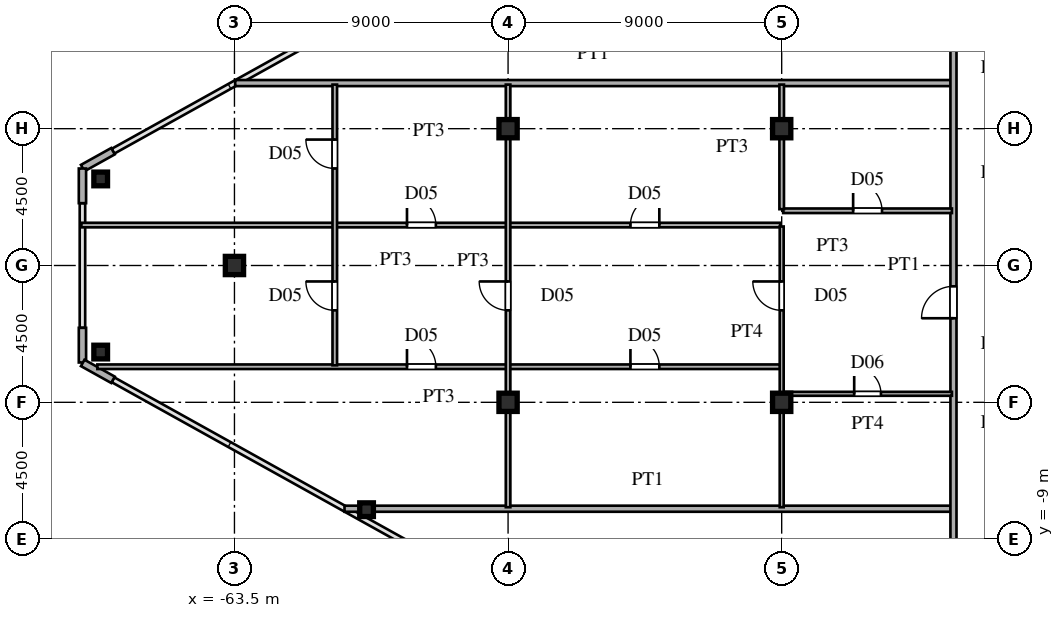
"""IFC4 building model, lengths in metres.
Left out: names, types, materials, properties, quantities, classifications, styles, units other than length and angle.
Written with IfcOpenShell. Run it as: python <this file> out.ifc"""

import sys

from ifc_helpers import new_model, si_unit, direction, frame, frame_2d, origin, origin_2d, place, context, subcontext, project, spatial, rectangle, hollow_rectangle, i_section, extrude, source, transform, mapped, element, fill, save


model = new_model("IFC4")
c1 = context("Model", 3, precision=1e-05, world=origin(), true_north=direction((0.0, 1.0)))
c2 = subcontext(c1, "Body", "Model", "MODEL_VIEW")
j1 = project(units=[si_unit("LENGTHUNIT", "METRE"), si_unit("PLANEANGLEUNIT", "RADIAN")], contexts=[c1])
p1 = place(None, origin())
s1 = spatial("IfcSite", under=j1, at=p1, CompositionType="ELEMENT")
p2 = place(p1, origin())
s2 = spatial("IfcBuilding", under=s1, at=p2, CompositionType="ELEMENT")
p3 = place(p2, frame((0.0, 0.0, 167.1)))
s3 = spatial("IfcBuildingStorey", under=s2, at=p3, CompositionType="ELEMENT", Elevation=167.1)
m1 = source(origin(), c2, "Body", "SweptSolid", [
    extrude(i_section(OverallWidth=0.6, OverallDepth=0.6, WebThickness=0.025, FlangeThickness=0.04, at=origin_2d()), origin(), (0.0, 0.0, 1.0), 3.6),
])
for number, where, z_axis, x_axis in (
    (1, (-45.5, -4.5, 0.0), (0.0, 0.0, 1.0), (1.0, 0.0, 0.0)),
    (2, (-45.5, 4.5, 0.0), (0.0, 0.0, 1.0), (1.0, 0.0, 0.0)),
    (3, (-54.5, -4.5, 0.0), (0.0, 0.0, 1.0), (1.0, 0.0, 0.0)),
    (4, (-54.5, 4.5, 0.0), (0.0, 0.0, 1.0), (1.0, 0.0, 0.0)),
    (5, (-63.5, 0.0, 0.0), (0.0, 0.0, 1.0), (1.0, 0.0, 0.0)),
):
    element("IfcColumn", number, at=place(p3, frame(where, z_axis=z_axis, x_axis=x_axis)), inside=s3, PredefinedType="COLUMN", context=c2, shape_type="MappedRepresentation", body=[
        mapped(m1, transform((0.0, 0.0, 0.0), scale=1.0)),
    ])
m2 = source(origin(), c2, "Body", "SweptSolid", [
    extrude(hollow_rectangle(XDim=0.45, YDim=0.45, WallThickness=0.018, at=origin_2d()), origin(), (0.0, 0.0, 1.0), 3.6),
])
for number, where, z_axis, x_axis in (
    (6, (-67.9, 2.847, 0.0), (0.0, 0.0, 1.0), (1.0, 0.0, 0.0)),
    (7, (-67.9, -2.847, 0.0), (0.0, 0.0, 1.0), (1.0, 0.0, 0.0)),
    (8, (-59.155, -8.031, 0.0), (0.0, 0.0, 1.0), (1.0, 0.0, 0.0)),
):
    element("IfcColumn", number, at=place(p3, frame(where, z_axis=z_axis, x_axis=x_axis)), inside=s3, PredefinedType="COLUMN", context=c2, shape_type="MappedRepresentation", body=[
        mapped(m2, transform((0.0, 0.0, 0.0), scale=1.0)),
    ])
for number, where, z_axis, x_axis in (
    (9, (-67.495, 3.759, 0.0), (0.0, 0.0, 1.0), (-0.874, -0.486, 0.0)),
    (10, (-68.5, 3.19, 0.0), (0.0, 0.0, 1.0), (0.0, -1.0, 0.0)),
    (11, (-68.5, -2.05, 0.0), (0.0, 0.0, 1.0), (0.0, -1.0, 0.0)),
    (12, (-68.491, -3.205, 0.0), (0.0, 0.0, 1.0), (0.874, -0.486, 0.0)),
):
    element("IfcWall", number, at=place(p3, frame(where, z_axis=z_axis, x_axis=x_axis)), inside=s3, PredefinedType="SOLIDWALL", context=c2, shape_type="SweptSolid", body=[
        extrude(rectangle(XDim=1.14, YDim=0.24, at=frame_2d((0.57, 0.0))), origin(), (0.0, 0.0, 1.0), 3.38),
    ])
p4 = place(p3, frame((-59.88, -8.0, 0.0), z_axis=(0.0, 0.0, 1.0), x_axis=(1.0, 0.0, 0.0)))
e13 = element("IfcWall", 13, at=p4, inside=s3, PredefinedType="PARTITIONING", context=c2, shape_type="SweptSolid", body=[
    extrude(rectangle(XDim=19.95, YDim=0.2, at=frame_2d((9.975, 0.0))), origin(), (0.0, 0.0, 1.0), 3.38),
])
p5 = place(p3, frame((-45.45, -4.22, 0.0), z_axis=(0.0, 0.0, 1.0), x_axis=(1.0, 0.0, 0.0)))
e14 = element("IfcWall", 14, at=p5, inside=s3, PredefinedType="PARTITIONING", context=c2, shape_type="SweptSolid", body=[
    extrude(rectangle(XDim=5.55, YDim=0.13, at=frame_2d((2.775, 0.0))), origin(), (0.0, 0.0, 1.0), 3.38),
])
p6 = place(p5, frame((2.335, 0.0, 0.0)))
e15 = element("IfcOpeningElement", 15, at=p6, cuts=e14, PredefinedType="OPENING", context=c2, shape_type="SweptSolid", body=[
    extrude(rectangle(XDim=0.88, YDim=2.1, at=frame_2d((0.44, 1.05))), frame((0.0, 0.075, 0.0), z_axis=(0.0, -1.0, 0.0), x_axis=(1.0, 0.0, 0.0)), (0.0, 0.0, 1.0), 0.15),
])
p7 = place(p3, frame((-68.009, -3.33, 0.0), z_axis=(0.0, 0.0, 1.0), x_axis=(1.0, 0.0, 0.0)))
e16 = element("IfcWall", 16, at=p7, inside=s3, PredefinedType="PARTITIONING", context=c2, shape_type="SweptSolid", body=[
    extrude(rectangle(XDim=22.459, YDim=0.15, at=frame_2d((11.229, 0.0))), origin(), (0.0, 0.0, 1.0), 3.38),
])
p8 = place(p7, frame((17.534, 0.0, 0.0)))
e17 = element("IfcOpeningElement", 17, at=p8, cuts=e16, PredefinedType="OPENING", context=c2, shape_type="SweptSolid", body=[
    extrude(rectangle(XDim=0.95, YDim=2.15, at=frame_2d((0.475, 1.075))), frame((0.0, 0.085, 0.0), z_axis=(0.0, -1.0, 0.0), x_axis=(1.0, 0.0, 0.0)), (0.0, 0.0, 1.0), 0.17),
])
p9 = place(p7, frame((10.184, 0.0, 0.0)))
e18 = element("IfcOpeningElement", 18, at=p9, cuts=e16, PredefinedType="OPENING", context=c2, shape_type="SweptSolid", body=[
    extrude(rectangle(XDim=0.95, YDim=2.15, at=frame_2d((0.475, 1.075))), frame((0.0, 0.085, 0.0), z_axis=(0.0, -1.0, 0.0), x_axis=(1.0, 0.0, 0.0)), (0.0, 0.0, 1.0), 0.17),
])
p10 = place(p3, frame((-68.535, 1.33, 0.0), z_axis=(0.0, 0.0, 1.0), x_axis=(1.0, 0.0, 0.0)))
e19 = element("IfcWall", 19, at=p10, inside=s3, PredefinedType="PARTITIONING", context=c2, shape_type="SweptSolid", body=[
    extrude(rectangle(XDim=22.985, YDim=0.15, at=frame_2d((11.492, 0.0))), origin(), (0.0, 0.0, 1.0), 3.38),
])
p11 = place(p10, frame((18.06, 0.0, 0.0)))
e20 = element("IfcOpeningElement", 20, at=p11, cuts=e19, PredefinedType="OPENING", context=c2, shape_type="SweptSolid", body=[
    extrude(rectangle(XDim=0.95, YDim=2.15, at=frame_2d((0.475, 1.075))), frame((0.0, 0.085, 0.0), z_axis=(0.0, -1.0, 0.0), x_axis=(1.0, 0.0, 0.0)), (0.0, 0.0, 1.0), 0.17),
])
p12 = place(p10, frame((10.71, 0.0, 0.0)))
e21 = element("IfcOpeningElement", 21, at=p12, cuts=e19, PredefinedType="OPENING", context=c2, shape_type="SweptSolid", body=[
    extrude(rectangle(XDim=0.95, YDim=2.15, at=frame_2d((0.475, 1.075))), frame((0.0, 0.085, 0.0), z_axis=(0.0, -1.0, 0.0), x_axis=(1.0, 0.0, 0.0)), (0.0, 0.0, 1.0), 0.17),
])
p13 = place(p3, frame((-45.45, 1.8, 0.0), z_axis=(0.0, 0.0, 1.0), x_axis=(1.0, 0.0, 0.0)))
e22 = element("IfcWall", 22, at=p13, inside=s3, PredefinedType="PARTITIONING", context=c2, shape_type="SweptSolid", body=[
    extrude(rectangle(XDim=5.55, YDim=0.15, at=frame_2d((2.775, 0.0))), origin(), (0.0, 0.0, 1.0), 3.38),
])
p14 = place(p13, frame((2.3, 0.0, 0.0)))
e23 = element("IfcOpeningElement", 23, at=p14, cuts=e22, PredefinedType="OPENING", context=c2, shape_type="SweptSolid", body=[
    extrude(rectangle(XDim=0.95, YDim=2.15, at=frame_2d((0.475, 1.075))), frame((0.0, 0.085, 0.0), z_axis=(0.0, -1.0, 0.0), x_axis=(1.0, 0.0, 0.0)), (0.0, 0.0, 1.0), 0.17),
])
p15 = place(p3, frame((-63.476, 6.0, 0.0), z_axis=(0.0, 0.0, 1.0), x_axis=(1.0, 0.0, 0.0)))
e24 = element("IfcWall", 24, at=p15, inside=s3, PredefinedType="PARTITIONING", context=c2, shape_type="SweptSolid", body=[
    extrude(rectangle(XDim=23.546, YDim=0.2, at=frame_2d((11.773, 0.0))), origin(), (0.0, 0.0, 1.0), 3.38),
])
p16 = place(p3, frame((-60.2, -3.283, 0.0), z_axis=(0.0, 0.0, 1.0), x_axis=(0.0, 1.0, 0.0)))
e25 = element("IfcWall", 25, at=p16, inside=s3, PredefinedType="PARTITIONING", context=c2, shape_type="SweptSolid", body=[
    extrude(rectangle(XDim=9.233, YDim=0.15, at=frame_2d((4.616, 0.0))), origin(), (0.0, 0.0, 1.0), 3.38),
])
p17 = place(p16, frame((1.808, 0.0, 0.0)))
e26 = element("IfcOpeningElement", 26, at=p17, cuts=e25, PredefinedType="OPENING", context=c2, shape_type="SweptSolid", body=[
    extrude(rectangle(XDim=0.95, YDim=2.15, at=frame_2d((0.475, 1.075))), frame((0.0, 0.085, 0.0), z_axis=(0.0, -1.0, 0.0), x_axis=(1.0, 0.0, 0.0)), (0.0, 0.0, 1.0), 0.17),
])
p18 = place(p16, frame((6.475, 0.0, 0.0)))
e27 = element("IfcOpeningElement", 27, at=p18, cuts=e25, PredefinedType="OPENING", context=c2, shape_type="SweptSolid", body=[
    extrude(rectangle(XDim=0.95, YDim=2.15, at=frame_2d((0.475, 1.075))), frame((0.0, 0.085, 0.0), z_axis=(0.0, -1.0, 0.0), x_axis=(1.0, 0.0, 0.0)), (0.0, 0.0, 1.0), 0.17),
])
p19 = place(p3, frame((-54.5, -7.95, 0.0), z_axis=(0.0, 0.0, 1.0), x_axis=(0.0, 1.0, 0.0)))
e28 = element("IfcWall", 28, at=p19, inside=s3, PredefinedType="PARTITIONING", context=c2, shape_type="SweptSolid", body=[
    extrude(rectangle(XDim=13.9, YDim=0.15, at=frame_2d((6.95, 0.0))), origin(), (0.0, 0.0, 1.0), 2.78),
])
p20 = place(p19, frame((6.475, 0.0, 0.0)))
e29 = element("IfcOpeningElement", 29, at=p20, cuts=e28, PredefinedType="OPENING", context=c2, shape_type="SweptSolid", body=[
    extrude(rectangle(XDim=0.95, YDim=2.15, at=frame_2d((0.475, 1.075))), frame((0.0, 0.085, 0.0), z_axis=(0.0, -1.0, 0.0), x_axis=(1.0, 0.0, 0.0)), (0.0, 0.0, 1.0), 0.17),
])
p21 = place(p3, frame((-45.5, -7.95, 0.0), z_axis=(0.0, 0.0, 1.0), x_axis=(0.0, 1.0, 0.0)))
e30 = element("IfcWall", 30, at=p21, inside=s3, PredefinedType="PARTITIONING", context=c2, shape_type="SweptSolid", body=[
    extrude(rectangle(XDim=9.233, YDim=0.13, at=frame_2d((4.616, 0.0))), origin(), (0.0, 0.0, 1.0), 2.78),
])
p22 = place(p21, frame((6.475, 0.0, 0.0)))
e31 = element("IfcOpeningElement", 31, at=p22, cuts=e30, PredefinedType="OPENING", context=c2, shape_type="SweptSolid", body=[
    extrude(rectangle(XDim=0.95, YDim=2.15, at=frame_2d((0.475, 1.075))), frame((0.0, 0.075, 0.0), z_axis=(0.0, -1.0, 0.0), x_axis=(1.0, 0.0, 0.0)), (0.0, 0.0, 1.0), 0.15),
])
p23 = place(p3, frame((-45.5, 1.852, 0.0), z_axis=(0.0, 0.0, 1.0), x_axis=(0.0, 1.0, 0.0)))
e32 = element("IfcWall", 32, at=p23, inside=s3, PredefinedType="PARTITIONING", context=c2, shape_type="SweptSolid", body=[
    extrude(rectangle(XDim=4.098, YDim=0.15, at=frame_2d((2.049, 0.0))), origin(), (0.0, 0.0, 1.0), 2.78),
])
p24 = place(p3, frame((-39.85, -15.715, 0.0), z_axis=(0.0, 0.0, 1.0), x_axis=(0.0, 1.0, 0.0)))
e33 = element("IfcWall", 33, at=p24, inside=s3, PredefinedType="PARTITIONING", context=c2, shape_type="SweptSolid", body=[
    extrude(rectangle(XDim=31.43, YDim=0.2, at=frame_2d((15.715, 0.0))), origin(), (0.0, 0.0, 1.0), 3.38),
])
p25 = place(p24, frame((3.29, 0.0, 0.0)))
e34 = element("IfcOpeningElement", 34, at=p25, cuts=e33, PredefinedType="OPENING", context=c2, shape_type="SweptSolid", body=[
    extrude(rectangle(XDim=1.05, YDim=2.25, at=frame_2d((0.525, 1.125))), frame((0.0, 0.11, 0.0), z_axis=(0.0, -1.0, 0.0), x_axis=(1.0, 0.0, 0.0)), (0.0, 0.0, 1.0), 0.22),
])
p26 = place(p24, frame((13.98, 0.0, 0.0)))
e35 = element("IfcOpeningElement", 35, at=p26, cuts=e33, PredefinedType="OPENING", context=c2, shape_type="SweptSolid", body=[
    extrude(rectangle(XDim=1.05, YDim=2.25, at=frame_2d((0.525, 1.125))), frame((0.0, 0.11, 0.0), z_axis=(0.0, -1.0, 0.0), x_axis=(1.0, 0.0, 0.0)), (0.0, 0.0, 1.0), 0.22),
])
p27 = place(p24, frame((26.09, 0.0, 0.0)))
e36 = element("IfcOpeningElement", 36, at=p27, cuts=e33, PredefinedType="OPENING", context=c2, shape_type="SweptSolid", body=[
    extrude(rectangle(XDim=1.05, YDim=2.25, at=frame_2d((0.525, 1.125))), frame((0.0, 0.11, 0.0), z_axis=(0.0, -1.0, 0.0), x_axis=(1.0, 0.0, 0.0)), (0.0, 0.0, 1.0), 0.22),
])
m3 = source(origin(), c2, "Body", "SweptSolid", [
    extrude(rectangle(XDim=0.88, YDim=2.1, at=frame_2d((0.44, 1.05))), frame((0.0, 0.025, 0.0), z_axis=(0.0, -1.0, 0.0), x_axis=(1.0, 0.0, 0.0)), (0.0, 0.0, 1.0), 0.05),
])
p28 = place(p6, origin())
e37 = element("IfcDoor", 37, at=p28, inside=s3, OperationType="SINGLE_SWING_LEFT", PredefinedType="DOOR", context=c2, shape_type="MappedRepresentation", body=[
    mapped(m3, transform((0.0, 0.0, 0.0), scale=1.0)),
])
fill(e15, e37)
m4 = source(origin(), c2, "Body", "SweptSolid", [
    extrude(rectangle(XDim=0.95, YDim=2.15, at=frame_2d((0.475, 1.075))), frame((0.0, 0.025, 0.0), z_axis=(0.0, -1.0, 0.0), x_axis=(1.0, 0.0, 0.0)), (0.0, 0.0, 1.0), 0.05),
])
p29 = place(p8, origin())
e38 = element("IfcDoor", 38, at=p29, inside=s3, OperationType="SINGLE_SWING_LEFT", PredefinedType="DOOR", context=c2, shape_type="MappedRepresentation", body=[
    mapped(m4, transform((0.0, 0.0, 0.0), scale=1.0)),
])
fill(e17, e38)
p30 = place(p9, origin())
e39 = element("IfcDoor", 39, at=p30, inside=s3, OperationType="SINGLE_SWING_LEFT", PredefinedType="DOOR", context=c2, shape_type="MappedRepresentation", body=[
    mapped(m4, transform((0.0, 0.0, 0.0), scale=1.0)),
])
fill(e18, e39)
p31 = place(p11, origin())
e40 = element("IfcDoor", 40, at=p31, inside=s3, OperationType="SINGLE_SWING_RIGHT", PredefinedType="DOOR", context=c2, shape_type="MappedRepresentation", body=[
    mapped(m4, transform((0.0, 0.0, 0.0), scale=1.0)),
])
fill(e20, e40)
p32 = place(p12, origin())
e41 = element("IfcDoor", 41, at=p32, inside=s3, OperationType="SINGLE_SWING_LEFT", PredefinedType="DOOR", context=c2, shape_type="MappedRepresentation", body=[
    mapped(m4, transform((0.0, 0.0, 0.0), scale=1.0)),
])
fill(e21, e41)
p33 = place(p14, origin())
e42 = element("IfcDoor", 42, at=p33, inside=s3, OperationType="SINGLE_SWING_LEFT", PredefinedType="DOOR", context=c2, shape_type="MappedRepresentation", body=[
    mapped(m4, transform((0.0, 0.0, 0.0), scale=1.0)),
])
fill(e23, e42)
p34 = place(p17, origin())
e43 = element("IfcDoor", 43, at=p34, inside=s3, OperationType="SINGLE_SWING_RIGHT", PredefinedType="DOOR", context=c2, shape_type="MappedRepresentation", body=[
    mapped(m4, transform((0.0, 0.0, 0.0), scale=1.0)),
])
fill(e26, e43)
p35 = place(p18, origin())
e44 = element("IfcDoor", 44, at=p35, inside=s3, OperationType="SINGLE_SWING_RIGHT", PredefinedType="DOOR", context=c2, shape_type="MappedRepresentation", body=[
    mapped(m4, transform((0.0, 0.0, 0.0), scale=1.0)),
])
fill(e27, e44)
p36 = place(p20, origin())
e45 = element("IfcDoor", 45, at=p36, inside=s3, OperationType="SINGLE_SWING_RIGHT", PredefinedType="DOOR", context=c2, shape_type="MappedRepresentation", body=[
    mapped(m4, transform((0.0, 0.0, 0.0), scale=1.0)),
])
fill(e29, e45)
p37 = place(p22, origin())
e46 = element("IfcDoor", 46, at=p37, inside=s3, OperationType="SINGLE_SWING_RIGHT", PredefinedType="DOOR", context=c2, shape_type="MappedRepresentation", body=[
    mapped(m4, transform((0.0, 0.0, 0.0), scale=1.0)),
])
fill(e31, e46)
m5 = source(origin(), c2, "Body", "SweptSolid", [
    extrude(rectangle(XDim=1.05, YDim=2.25, at=frame_2d((0.525, 1.125))), frame((0.0, 0.025, 0.0), z_axis=(0.0, -1.0, 0.0), x_axis=(1.0, 0.0, 0.0)), (0.0, 0.0, 1.0), 0.05),
])
p38 = place(p26, origin())
e47 = element("IfcDoor", 47, at=p38, inside=s3, OperationType="SINGLE_SWING_LEFT", PredefinedType="DOOR", context=c2, shape_type="MappedRepresentation", body=[
    mapped(m5, transform((0.0, 0.0, 0.0), scale=1.0)),
])
fill(e35, e47)
save(model, sys.argv[1])
